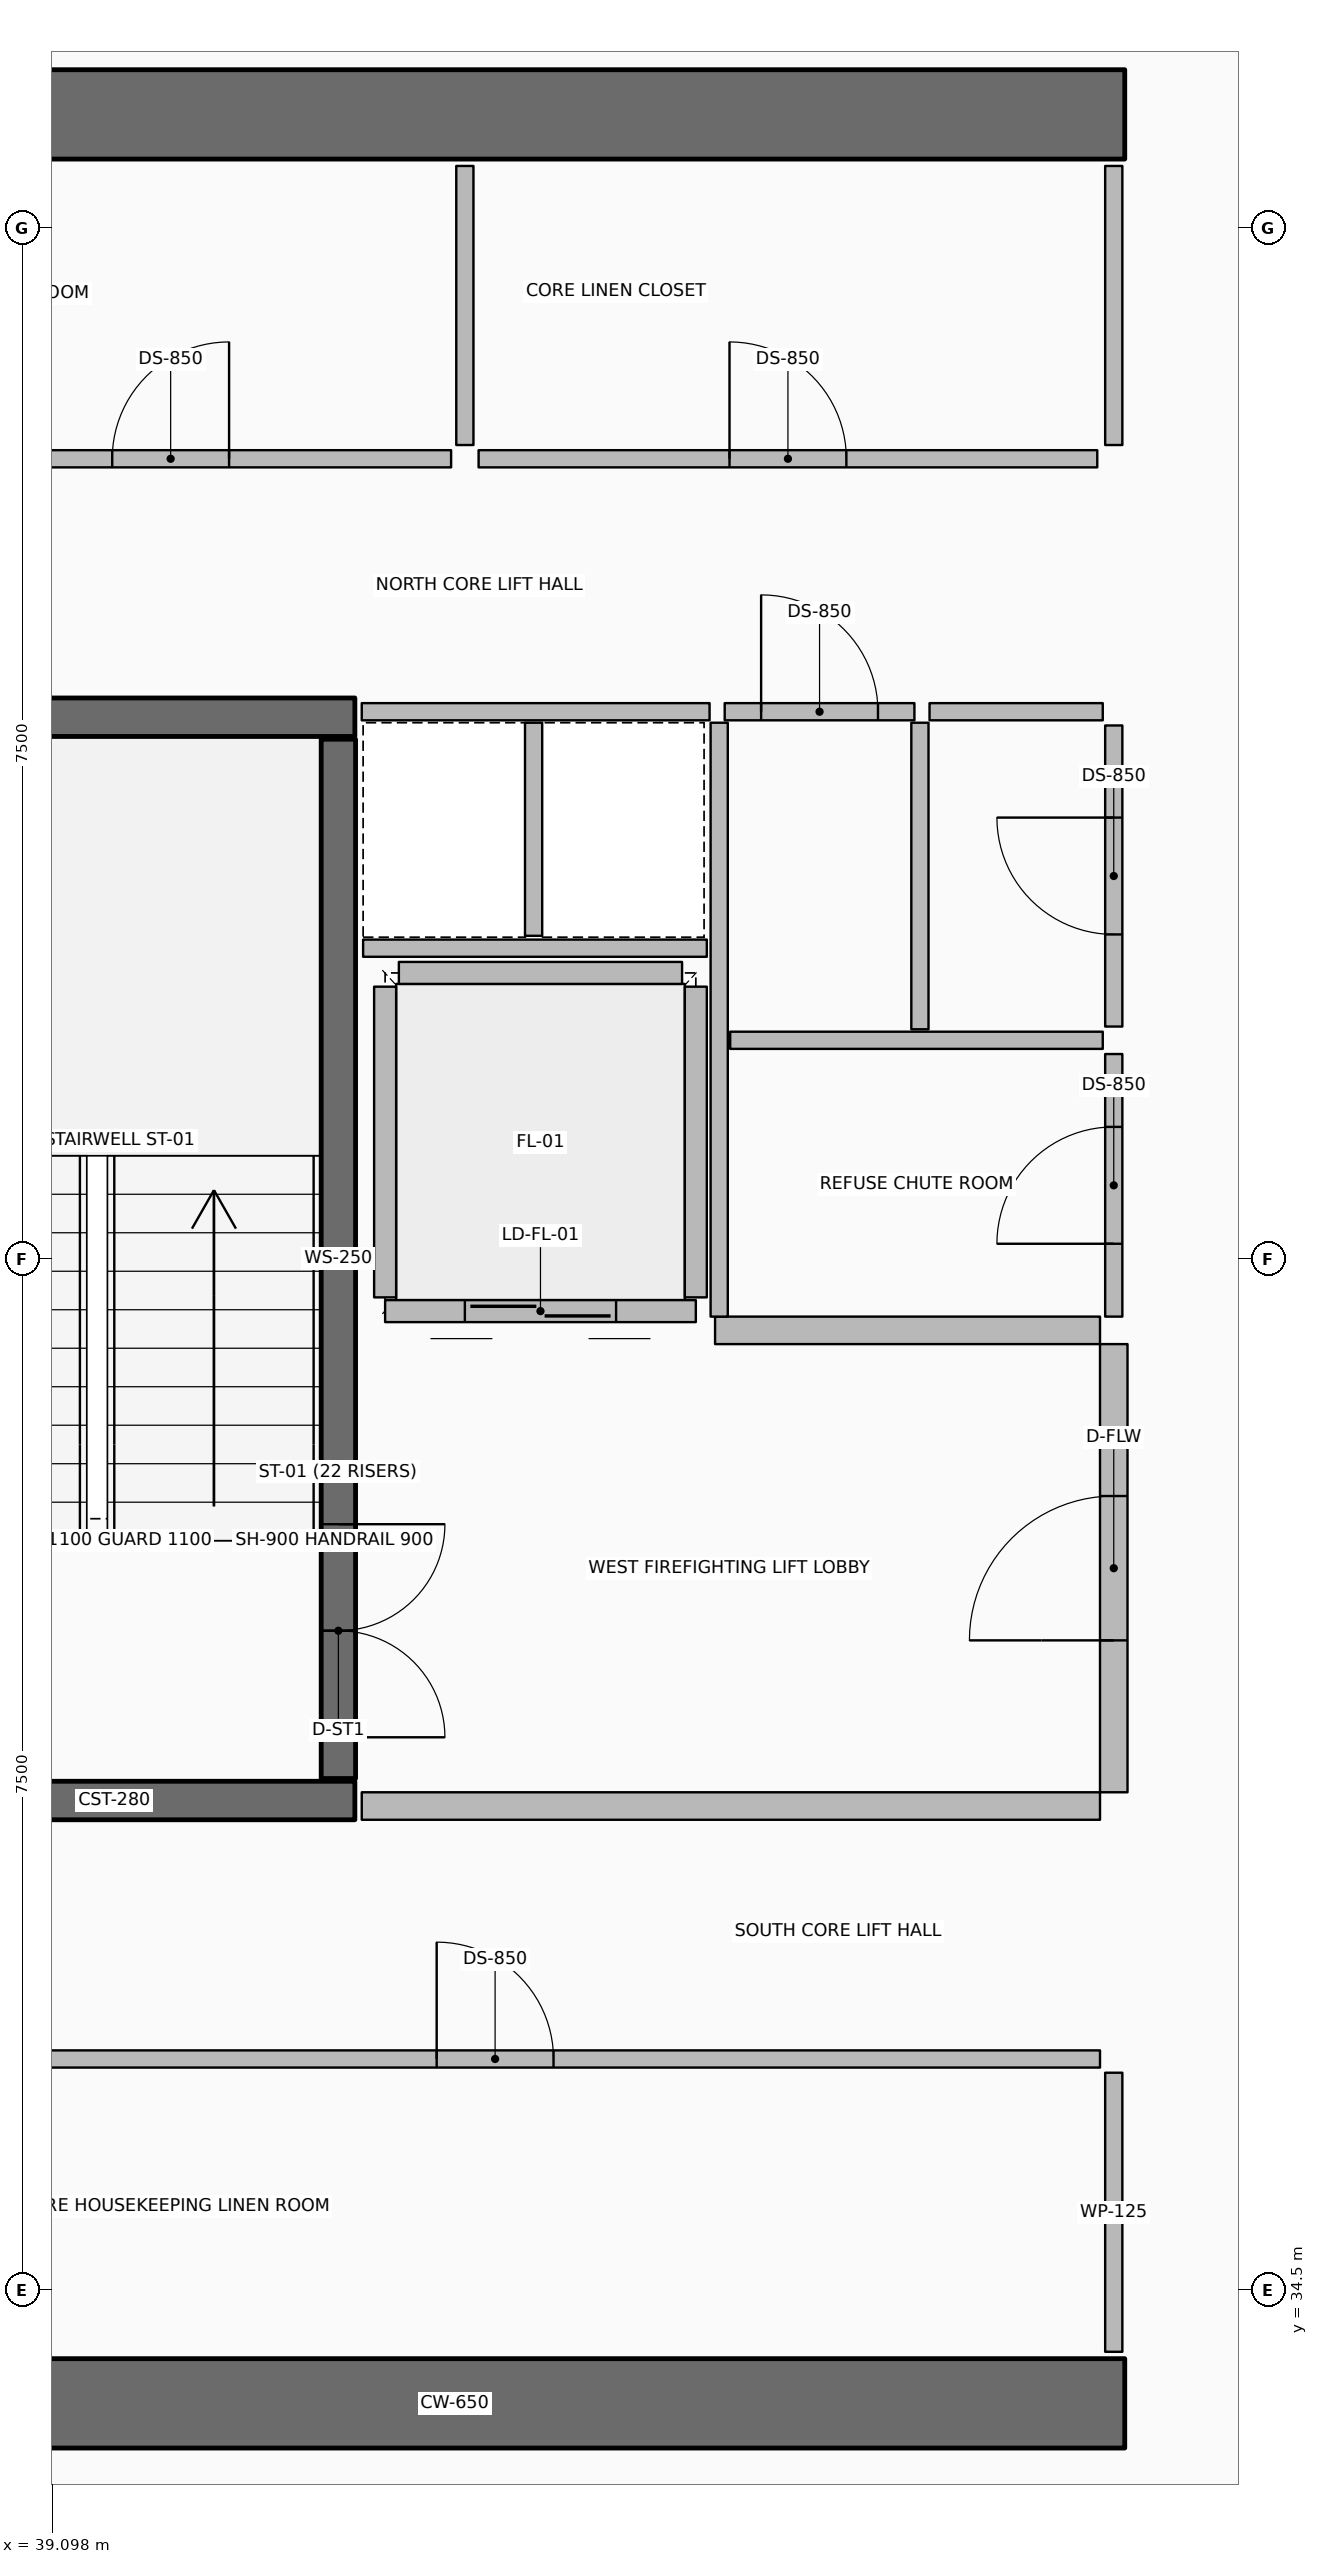
"""IFC4 building model, lengths in metres.
Left out: names, types, materials, properties, quantities, classifications, styles, units other than length and angle.
Written with IfcOpenShell. Run it as: python <this file> out.ifc"""

import sys

from ifc_helpers import new_model, si_unit, direction, frame, frame_2d, origin, origin_2d, place, context, subcontext, project, spatial, rectangle, hollow_rectangle, extrude, element, fill, save


model = new_model("IFC4")
c1 = context("Model", 3, precision=1e-05, world=origin(), true_north=direction((0.0, 1.0)))
c2 = subcontext(c1, "Body", "Model", "MODEL_VIEW")
j1 = project(units=[si_unit("LENGTHUNIT", "METRE"), si_unit("PLANEANGLEUNIT", "RADIAN")], contexts=[c1])
p1 = place(None, origin())
s1 = spatial("IfcSite", under=j1, at=p1, CompositionType="ELEMENT")
p2 = place(p1, origin())
s2 = spatial("IfcBuilding", under=s1, at=p2, CompositionType="ELEMENT")
p3 = place(p2, frame((0.0, 0.0, 236.7)))
s3 = spatial("IfcBuildingStorey", under=s2, at=p3, CompositionType="ELEMENT", Elevation=236.7)
for number, where, z_axis, x_axis in (
    (1, (37.15, 33.675, 0.0), (0.0, 0.0, 1.0), (1.0, 0.0, 0.0)),
    (2, (37.15, 50.325, 0.0), (0.0, 0.0, 1.0), (1.0, 0.0, 0.0)),
):
    element("IfcWall", number, at=place(p3, frame(where, z_axis=z_axis, x_axis=x_axis)), inside=s3, PredefinedType="SHEAR", context=c2, shape_type="SweptSolid", body=[
        extrude(rectangle(XDim=9.75, YDim=0.65, at=frame_2d((4.875, 0.0))), origin(), (0.0, 0.0, 1.0), 3.85),
    ])
for number, where, z_axis, x_axis in (
    (3, (37.8, 38.06, 0.0), (0.0, 0.0, 1.0), (1.0, 0.0, 0.0)),
    (4, (37.8, 45.94, 0.0), (0.0, 0.0, 1.0), (1.0, 0.0, 0.0)),
):
    element("IfcWall", number, at=place(p3, frame(where, z_axis=z_axis, x_axis=x_axis)), inside=s3, PredefinedType="SHEAR", context=c2, shape_type="SweptSolid", body=[
        extrude(rectangle(XDim=3.5, YDim=0.28, at=frame_2d((1.75, 0.0))), origin(), (0.0, 0.0, 1.0), 3.85),
    ])
p4 = place(p3, frame((41.18, 42.75, 0.0), z_axis=(0.0, 0.0, 1.0), x_axis=(1.0, 0.0, 0.0)))
e5 = element("IfcColumn", 5, at=p4, inside=s3, PredefinedType="COLUMN", context=c2, shape_type="SweptSolid", body=[
    extrude(hollow_rectangle(XDim=0.2, YDim=0.2, WallThickness=0.01, InnerFilletRadius=0.01, OuterFilletRadius=0.02, at=origin_2d()), origin(), (0.0, 0.0, 1.0), 1.72),
])
p5 = place(p3, frame((41.18, 38.22, 0.0), z_axis=(0.0, 0.0, 1.0), x_axis=(0.0, 1.0, 0.0)))
e6 = element("IfcWall", 6, at=p5, inside=s3, PredefinedType="SOLIDWALL", context=c2, shape_type="SweptSolid", body=[
    extrude(rectangle(XDim=7.56, YDim=0.25, at=frame_2d((3.78, 0.0))), origin(), (0.0, 0.0, 1.0), 3.59),
])
p6 = place(p5, frame((0.3, 0.0, 0.0)))
e7 = element("IfcOpeningElement", 7, at=p6, cuts=e6, PredefinedType="OPENING", context=c2, shape_type="SweptSolid", body=[
    extrude(rectangle(XDim=1.55, YDim=2.15, at=frame_2d((0.775, 1.075))), frame((0.0, 0.135, 0.0), z_axis=(0.0, -1.0, 0.0), x_axis=(1.0, 0.0, 0.0)), (0.0, 0.0, 1.0), 0.27),
])
p7 = place(p3, frame((39.975, 47.995, 0.0), z_axis=(0.0, 0.0, 1.0), x_axis=(-1.0, 0.0, 0.0)))
e8 = element("IfcWall", 8, at=p7, inside=s3, PredefinedType="PARTITIONING", context=c2, shape_type="SweptSolid", body=[
    extrude(rectangle(XDim=2.11, YDim=0.16, at=frame_2d((1.055, 0.0))), origin(), (0.0, 0.0, 1.0), 3.59),
])
p8 = place(p3, frame((39.975, 48.095, 0.0), z_axis=(0.0, 0.0, 1.0), x_axis=(0.0, 1.0, 0.0)))
e9 = element("IfcWall", 9, at=p8, inside=s3, PredefinedType="PARTITIONING", context=c2, shape_type="SweptSolid", body=[
    extrude(rectangle(XDim=1.61, YDim=0.16, at=frame_2d((0.805, 0.0))), origin(), (0.0, 0.0, 1.0), 3.59),
])
p9 = place(p3, frame((42.125, 47.995, 0.0), z_axis=(0.0, 0.0, 1.0), x_axis=(-1.0, 0.0, 0.0)))
e10 = element("IfcWall", 10, at=p9, inside=s3, PredefinedType="PARTITIONING", context=c2, shape_type="SweptSolid", body=[
    extrude(rectangle(XDim=2.11, YDim=0.16, at=frame_2d((1.055, 0.0))), origin(), (0.0, 0.0, 1.0), 3.59),
])
p10 = place(p3, frame((42.125, 48.095, 0.0), z_axis=(0.0, 0.0, 1.0), x_axis=(0.0, 1.0, 0.0)))
e11 = element("IfcWall", 11, at=p10, inside=s3, PredefinedType="PARTITIONING", context=c2, shape_type="SweptSolid", body=[
    extrude(rectangle(XDim=1.61, YDim=0.16, at=frame_2d((0.805, 0.0))), origin(), (0.0, 0.0, 1.0), 3.59),
])
p11 = place(p3, frame((44.275, 47.995, 0.0), z_axis=(0.0, 0.0, 1.0), x_axis=(-1.0, 0.0, 0.0)))
e12 = element("IfcWall", 12, at=p11, inside=s3, PredefinedType="PARTITIONING", context=c2, shape_type="SweptSolid", body=[
    extrude(rectangle(XDim=2.11, YDim=0.16, at=frame_2d((1.055, 0.0))), origin(), (0.0, 0.0, 1.0), 3.59),
])
p12 = place(p3, frame((44.275, 48.095, 0.0), z_axis=(0.0, 0.0, 1.0), x_axis=(0.0, 1.0, 0.0)))
e13 = element("IfcWall", 13, at=p12, inside=s3, PredefinedType="PARTITIONING", context=c2, shape_type="SweptSolid", body=[
    extrude(rectangle(XDim=1.61, YDim=0.16, at=frame_2d((0.805, 0.0))), origin(), (0.0, 0.0, 1.0), 3.59),
])
p13 = place(p3, frame((46.58, 47.945, 0.0), z_axis=(0.0, 0.0, 1.0), x_axis=(-1.0, 0.0, 0.0)))
e14 = element("IfcWall", 14, at=p13, inside=s3, PredefinedType="PARTITIONING", context=c2, shape_type="SweptSolid", body=[
    extrude(rectangle(XDim=2.26, YDim=0.16, at=frame_2d((1.13, 0.0))), origin(), (0.0, 0.0, 1.0), 3.59),
])
p14 = place(p3, frame((46.58, 48.045, 0.0), z_axis=(0.0, 0.0, 1.0), x_axis=(0.0, 1.0, 0.0)))
e15 = element("IfcWall", 15, at=p14, inside=s3, PredefinedType="PARTITIONING", context=c2, shape_type="SweptSolid", body=[
    extrude(rectangle(XDim=1.71, YDim=0.16, at=frame_2d((0.855, 0.0))), origin(), (0.0, 0.0, 1.0), 3.59),
])
p15 = place(p3, frame((44.32, 36.055, 0.0), z_axis=(0.0, 0.0, 1.0), x_axis=(1.0, 0.0, 0.0)))
e16 = element("IfcWall", 16, at=p15, inside=s3, PredefinedType="PARTITIONING", context=c2, shape_type="SweptSolid", body=[
    extrude(rectangle(XDim=2.26, YDim=0.16, at=frame_2d((1.13, 0.0))), origin(), (0.0, 0.0, 1.0), 3.59),
])
p16 = place(p3, frame((46.58, 34.245, 0.0), z_axis=(0.0, 0.0, 1.0), x_axis=(0.0, 1.0, 0.0)))
e17 = element("IfcWall", 17, at=p16, inside=s3, PredefinedType="PARTITIONING", context=c2, shape_type="SweptSolid", body=[
    extrude(rectangle(XDim=1.71, YDim=0.16, at=frame_2d((0.855, 0.0))), origin(), (0.0, 0.0, 1.0), 3.59),
])
p17 = place(p3, frame((43.78, 41.62, 0.0), z_axis=(0.0, 0.0, 1.0), x_axis=(-1.0, 0.0, 0.0)))
e18 = element("IfcWall", 18, at=p17, inside=s3, PredefinedType="PARTITIONING", context=c2, shape_type="SweptSolid", body=[
    extrude(rectangle(XDim=2.26, YDim=0.16, at=frame_2d((1.13, 0.0))), origin(), (0.0, 0.0, 1.0), 3.59),
])
p18 = place(p17, frame((0.58, 0.0, 0.0)))
e19 = element("IfcOpeningElement", 19, at=p18, cuts=e18, PredefinedType="OPENING", context=c2, shape_type="SweptSolid", body=[
    extrude(rectangle(XDim=1.1, YDim=2.1, at=frame_2d((0.55, 1.05))), frame((0.0, 0.09, 0.0), z_axis=(0.0, -1.0, 0.0), x_axis=(1.0, 0.0, 0.0)), (0.0, 0.0, 1.0), 0.18),
])
for number, where, z_axis, x_axis in (
    (20, (43.78, 41.72, 0.0), (0.0, 0.0, 1.0), (0.0, 1.0, 0.0)),
    (21, (41.52, 41.72, 0.0), (0.0, 0.0, 1.0), (0.0, 1.0, 0.0)),
):
    element("IfcWall", number, at=place(p3, frame(where, z_axis=z_axis, x_axis=x_axis)), inside=s3, PredefinedType="PARTITIONING", context=c2, shape_type="SweptSolid", body=[
        extrude(rectangle(XDim=2.26, YDim=0.16, at=frame_2d((1.13, 0.0))), origin(), (0.0, 0.0, 1.0), 3.59),
    ])
p19 = place(p3, frame((41.62, 44.08, 0.0), z_axis=(0.0, 0.0, 1.0), x_axis=(1.0, 0.0, 0.0)))
e22 = element("IfcWall", 22, at=p19, inside=s3, PredefinedType="PARTITIONING", context=c2, shape_type="SweptSolid", body=[
    extrude(rectangle(XDim=2.06, YDim=0.16, at=frame_2d((1.03, 0.0))), origin(), (0.0, 0.0, 1.0), 3.59),
])
for number, where, z_axis, x_axis in (
    (23, (44.28, 34.05, 0.0), (0.0, 0.0, 1.0), (0.0, 1.0, 0.0)),
    (24, (41.35, 34.05, 0.0), (0.0, 0.0, 1.0), (0.0, 1.0, 0.0)),
):
    element("IfcWall", number, at=place(p3, frame(where, z_axis=z_axis, x_axis=x_axis)), inside=s3, PredefinedType="PARTITIONING", context=c2, shape_type="SweptSolid", body=[
        extrude(rectangle(XDim=2.03, YDim=0.125, at=frame_2d((1.015, 0.0))), origin(), (0.0, 0.0, 1.0), 3.03),
    ])
p20 = place(p3, frame((37.92, 36.18, 0.0), z_axis=(0.0, 0.0, 1.0), x_axis=(1.0, 0.0, 0.0)))
e25 = element("IfcWall", 25, at=p20, inside=s3, PredefinedType="PARTITIONING", context=c2, shape_type="SweptSolid", body=[
    extrude(rectangle(XDim=3.33, YDim=0.125, at=frame_2d((1.665, 0.0))), origin(), (0.0, 0.0, 1.0), 3.03),
])
p21 = place(p20, frame((1.24, 0.0, 0.0)))
e26 = element("IfcOpeningElement", 26, at=p21, cuts=e25, PredefinedType="OPENING", context=c2, shape_type="SweptSolid", body=[
    extrude(rectangle(XDim=0.85, YDim=2.06, at=frame_2d((0.425, 1.03))), frame((0.0, 0.073, 0.0), z_axis=(0.0, -1.0, 0.0), x_axis=(1.0, 0.0, 0.0)), (0.0, 0.0, 1.0), 0.145),
])
p22 = place(p3, frame((41.45, 36.18, 0.0), z_axis=(0.0, 0.0, 1.0), x_axis=(1.0, 0.0, 0.0)))
e27 = element("IfcWall", 27, at=p22, inside=s3, PredefinedType="PARTITIONING", context=c2, shape_type="SweptSolid", body=[
    extrude(rectangle(XDim=2.73, YDim=0.125, at=frame_2d((1.365, 0.0))), origin(), (0.0, 0.0, 1.0), 3.03),
])
p23 = place(p22, frame((0.94, 0.0, 0.0)))
e28 = element("IfcOpeningElement", 28, at=p23, cuts=e27, PredefinedType="OPENING", context=c2, shape_type="SweptSolid", body=[
    extrude(rectangle(XDim=0.85, YDim=2.06, at=frame_2d((0.425, 1.03))), frame((0.0, 0.073, 0.0), z_axis=(0.0, -1.0, 0.0), x_axis=(1.0, 0.0, 0.0)), (0.0, 0.0, 1.0), 0.145),
])
p24 = place(p3, frame((41.35, 38.02, 0.0), z_axis=(0.0, 0.0, 1.0), x_axis=(1.0, 0.0, 0.0)))
e29 = element("IfcWall", 29, at=p24, inside=s3, PredefinedType="PARTITIONING", context=c2, shape_type="SweptSolid", body=[
    extrude(rectangle(XDim=5.37, YDim=0.2, at=frame_2d((2.685, 0.0))), origin(), (0.0, 0.0, 1.0), 3.59),
])
p25 = place(p3, frame((43.92, 41.48, 0.0), z_axis=(0.0, 0.0, 1.0), x_axis=(1.0, 0.0, 0.0)))
e30 = element("IfcWall", 30, at=p25, inside=s3, PredefinedType="PARTITIONING", context=c2, shape_type="SweptSolid", body=[
    extrude(rectangle(XDim=2.8, YDim=0.2, at=frame_2d((1.4, 0.0))), origin(), (0.0, 0.0, 1.0), 3.59),
])
p26 = place(p3, frame((46.82, 38.12, 0.0), z_axis=(0.0, 0.0, 1.0), x_axis=(0.0, 1.0, 0.0)))
e31 = element("IfcWall", 31, at=p26, inside=s3, PredefinedType="PARTITIONING", context=c2, shape_type="SweptSolid", body=[
    extrude(rectangle(XDim=3.26, YDim=0.2, at=frame_2d((1.63, 0.0))), origin(), (0.0, 0.0, 1.0), 3.59),
])
p27 = place(p26, frame((1.105, 0.0, 0.0)))
e32 = element("IfcOpeningElement", 32, at=p27, cuts=e31, PredefinedType="OPENING", context=c2, shape_type="SweptSolid", body=[
    extrude(rectangle(XDim=1.05, YDim=2.1, at=frame_2d((0.525, 1.05))), frame((0.0, 0.11, 0.0), z_axis=(0.0, -1.0, 0.0), x_axis=(1.0, 0.0, 0.0)), (0.0, 0.0, 1.0), 0.22),
])
p28 = place(p3, frame((41.36, 45.98, 0.0), z_axis=(0.0, 0.0, 1.0), x_axis=(1.0, 0.0, 0.0)))
e33 = element("IfcWall", 33, at=p28, inside=s3, PredefinedType="PARTITIONING", context=c2, shape_type="SweptSolid", body=[
    extrude(rectangle(XDim=5.36, YDim=0.125, at=frame_2d((2.68, 0.0))), origin(), (0.0, 0.0, 1.0), 3.03),
])
p29 = place(p3, frame((41.36, 44.26, 0.0), z_axis=(0.0, 0.0, 1.0), x_axis=(1.0, 0.0, 0.0)))
e34 = element("IfcWall", 34, at=p29, inside=s3, PredefinedType="PARTITIONING", context=c2, shape_type="SweptSolid", body=[
    extrude(rectangle(XDim=2.5, YDim=0.125, at=frame_2d((1.25, 0.0))), origin(), (0.0, 0.0, 1.0), 3.03),
])
p30 = place(p3, frame((42.6, 44.35, 0.0), z_axis=(0.0, 0.0, 1.0), x_axis=(0.0, 1.0, 0.0)))
e35 = element("IfcWall", 35, at=p30, inside=s3, PredefinedType="PARTITIONING", context=c2, shape_type="SweptSolid", body=[
    extrude(rectangle(XDim=1.55, YDim=0.125, at=frame_2d((0.775, 0.0))), origin(), (0.0, 0.0, 1.0), 3.03),
])
p31 = place(p3, frame((43.95, 41.58, 0.0), z_axis=(0.0, 0.0, 1.0), x_axis=(0.0, 1.0, 0.0)))
e36 = element("IfcWall", 36, at=p31, inside=s3, PredefinedType="PARTITIONING", context=c2, shape_type="SweptSolid", body=[
    extrude(rectangle(XDim=4.32, YDim=0.125, at=frame_2d((2.16, 0.0))), origin(), (0.0, 0.0, 1.0), 3.03),
])
p32 = place(p3, frame((44.03, 43.73, 0.0), z_axis=(0.0, 0.0, 1.0), x_axis=(1.0, 0.0, 0.0)))
e37 = element("IfcWall", 37, at=p32, inside=s3, PredefinedType="PARTITIONING", context=c2, shape_type="SweptSolid", body=[
    extrude(rectangle(XDim=2.71, YDim=0.125, at=frame_2d((1.355, 0.0))), origin(), (0.0, 0.0, 1.0), 3.03),
])
p33 = place(p3, frame((46.82, 41.58, 0.0), z_axis=(0.0, 0.0, 1.0), x_axis=(0.0, 1.0, 0.0)))
e38 = element("IfcWall", 38, at=p33, inside=s3, PredefinedType="PARTITIONING", context=c2, shape_type="SweptSolid", body=[
    extrude(rectangle(XDim=2.05, YDim=0.125, at=frame_2d((1.025, 0.0))), origin(), (0.0, 0.0, 1.0), 3.03),
])
p34 = place(p33, frame((0.6, 0.0, 0.0)))
e39 = element("IfcOpeningElement", 39, at=p34, cuts=e38, PredefinedType="OPENING", context=c2, shape_type="SweptSolid", body=[
    extrude(rectangle(XDim=0.85, YDim=2.06, at=frame_2d((0.425, 1.03))), frame((0.0, 0.073, 0.0), z_axis=(0.0, -1.0, 0.0), x_axis=(1.0, 0.0, 0.0)), (0.0, 0.0, 1.0), 0.145),
])
p35 = place(p3, frame((46.82, 43.83, 0.0), z_axis=(0.0, 0.0, 1.0), x_axis=(0.0, 1.0, 0.0)))
e40 = element("IfcWall", 40, at=p35, inside=s3, PredefinedType="PARTITIONING", context=c2, shape_type="SweptSolid", body=[
    extrude(rectangle(XDim=2.05, YDim=0.125, at=frame_2d((1.025, 0.0))), origin(), (0.0, 0.0, 1.0), 3.03),
])
p36 = place(p35, frame((0.6, 0.0, 0.0)))
e41 = element("IfcOpeningElement", 41, at=p36, cuts=e40, PredefinedType="OPENING", context=c2, shape_type="SweptSolid", body=[
    extrude(rectangle(XDim=0.85, YDim=2.06, at=frame_2d((0.425, 1.03))), frame((0.0, 0.073, 0.0), z_axis=(0.0, -1.0, 0.0), x_axis=(1.0, 0.0, 0.0)), (0.0, 0.0, 1.0), 0.145),
])
p37 = place(p6, origin())
e42 = element("IfcDoor", 42, at=p37, inside=s3, OperationType="DOUBLE_DOOR_SINGLE_SWING", PredefinedType="DOOR", context=c2, shape_type="SweptSolid", body=[
    extrude(rectangle(XDim=1.55, YDim=2.15, at=frame_2d((0.775, 1.075))), frame((0.0, 0.025, 0.0), z_axis=(0.0, -1.0, 0.0), x_axis=(1.0, 0.0, 0.0)), (0.0, 0.0, 1.0), 0.05),
])
fill(e7, e42)
p38 = place(p18, origin())
e43 = element("IfcDoor", 43, at=p38, inside=s3, OperationType="DOUBLE_DOOR_SLIDING", PredefinedType="DOOR", context=c2, shape_type="SweptSolid", body=[
    extrude(rectangle(XDim=1.1, YDim=2.1, at=frame_2d((0.55, 1.05))), frame((0.0, 0.025, 0.0), z_axis=(0.0, -1.0, 0.0), x_axis=(1.0, 0.0, 0.0)), (0.0, 0.0, 1.0), 0.05),
])
fill(e19, e43)
p39 = place(p21, origin())
e44 = element("IfcDoor", 44, at=p39, inside=s3, OperationType="SINGLE_SWING_RIGHT", PredefinedType="DOOR", context=c2, shape_type="SweptSolid", body=[
    extrude(rectangle(XDim=0.85, YDim=2.06, at=frame_2d((0.425, 1.03))), frame((0.0, 0.025, 0.0), z_axis=(0.0, -1.0, 0.0), x_axis=(1.0, 0.0, 0.0)), (0.0, 0.0, 1.0), 0.05),
])
fill(e26, e44)
p40 = place(p23, origin())
e45 = element("IfcDoor", 45, at=p40, inside=s3, OperationType="SINGLE_SWING_LEFT", PredefinedType="DOOR", context=c2, shape_type="SweptSolid", body=[
    extrude(rectangle(XDim=0.85, YDim=2.06, at=frame_2d((0.425, 1.03))), frame((0.0, 0.025, 0.0), z_axis=(0.0, -1.0, 0.0), x_axis=(1.0, 0.0, 0.0)), (0.0, 0.0, 1.0), 0.05),
])
fill(e28, e45)
p41 = place(p27, origin())
e46 = element("IfcDoor", 46, at=p41, inside=s3, OperationType="SINGLE_SWING_RIGHT", PredefinedType="DOOR", context=c2, shape_type="SweptSolid", body=[
    extrude(rectangle(XDim=1.05, YDim=2.1, at=frame_2d((0.525, 1.05))), frame((0.0, 0.025, 0.0), z_axis=(0.0, -1.0, 0.0), x_axis=(1.0, 0.0, 0.0)), (0.0, 0.0, 1.0), 0.05),
])
fill(e32, e46)
p42 = place(p34, origin())
e47 = element("IfcDoor", 47, at=p42, inside=s3, OperationType="SINGLE_SWING_RIGHT", PredefinedType="DOOR", context=c2, shape_type="SweptSolid", body=[
    extrude(rectangle(XDim=0.85, YDim=2.06, at=frame_2d((0.425, 1.03))), frame((0.0, 0.025, 0.0), z_axis=(0.0, -1.0, 0.0), x_axis=(1.0, 0.0, 0.0)), (0.0, 0.0, 1.0), 0.05),
])
fill(e39, e47)
p43 = place(p36, origin())
e48 = element("IfcDoor", 48, at=p43, inside=s3, OperationType="SINGLE_SWING_LEFT", PredefinedType="DOOR", context=c2, shape_type="SweptSolid", body=[
    extrude(rectangle(XDim=0.85, YDim=2.06, at=frame_2d((0.425, 1.03))), frame((0.0, 0.025, 0.0), z_axis=(0.0, -1.0, 0.0), x_axis=(1.0, 0.0, 0.0)), (0.0, 0.0, 1.0), 0.05),
])
fill(e41, e48)
save(model, sys.argv[1])
